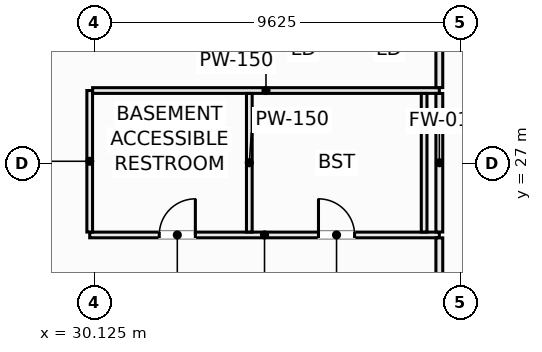
"""IFC4 building model, lengths in metres.
Left out: names, types, materials, properties, quantities, classifications, styles, units other than length and angle.
Written with IfcOpenShell. Run it as: python <this file> out.ifc"""

import sys

from ifc_helpers import new_model, si_unit, direction, frame, frame_2d, origin, place, context, subcontext, project, spatial, rectangle, extrude, element, fill, save


model = new_model("IFC4")
c1 = context("Model", 3, precision=1e-05, world=origin(), true_north=direction((0.0, 1.0)))
c2 = subcontext(c1, "Body", "Model", "MODEL_VIEW")
j1 = project(units=[si_unit("LENGTHUNIT", "METRE"), si_unit("PLANEANGLEUNIT", "RADIAN")], contexts=[c1])
p1 = place(None, origin())
s1 = spatial("IfcSite", under=j1, at=p1, CompositionType="ELEMENT")
p2 = place(p1, origin())
s2 = spatial("IfcBuilding", under=s1, at=p2, CompositionType="ELEMENT")
p3 = place(p2, frame((0.0, 0.0, -9.0)))
s3 = spatial("IfcBuildingStorey", under=s2, at=p3, CompositionType="ELEMENT", Elevation=-9.0)
p4 = place(p3, frame((30.0, 25.12, 0.0), z_axis=(0.0, 0.0, 1.0), x_axis=(1.0, 0.0, 0.0)))
e1 = element("IfcWall", 1, at=p4, inside=s3, PredefinedType="PARTITIONING", context=c2, shape_type="SweptSolid", body=[
    extrude(rectangle(XDim=9.2, YDim=0.15, at=frame_2d((4.6, 0.0))), origin(), (0.0, 0.0, 1.0), 4.18),
])
p5 = place(p4, frame((1.83, 0.0, 0.0)))
e2 = element("IfcOpeningElement", 2, at=p5, cuts=e1, PredefinedType="OPENING", context=c2, shape_type="SweptSolid", body=[
    extrude(rectangle(XDim=0.95, YDim=2.1, at=frame_2d((0.475, 1.05))), frame((0.0, 0.085, 0.0), z_axis=(0.0, -1.0, 0.0), x_axis=(1.0, 0.0, 0.0)), (0.0, 0.0, 1.0), 0.17),
])
p6 = place(p4, frame((6.02, 0.0, 0.0)))
e3 = element("IfcOpeningElement", 3, at=p6, cuts=e1, PredefinedType="OPENING", context=c2, shape_type="SweptSolid", body=[
    extrude(rectangle(XDim=0.95, YDim=2.1, at=frame_2d((0.475, 1.05))), frame((0.0, 0.085, 0.0), z_axis=(0.0, -1.0, 0.0), x_axis=(1.0, 0.0, 0.0)), (0.0, 0.0, 1.0), 0.17),
])
p7 = place(p3, frame((30.0, 25.197, 0.0), z_axis=(0.0, 0.0, 1.0), x_axis=(0.0, 1.0, 0.0)))
e4 = element("IfcWall", 4, at=p7, inside=s3, PredefinedType="PARTITIONING", context=c2, shape_type="SweptSolid", body=[
    extrude(rectangle(XDim=3.723, YDim=0.15, at=frame_2d((1.861, 0.0))), origin(), (0.0, 0.0, 1.0), 4.18),
])
p8 = place(p3, frame((30.077, 28.92, 0.0), z_axis=(0.0, 0.0, 1.0), x_axis=(1.0, 0.0, 0.0)))
e5 = element("IfcWall", 5, at=p8, inside=s3, PredefinedType="PARTITIONING", context=c2, shape_type="SweptSolid", body=[
    extrude(rectangle(XDim=9.123, YDim=0.15, at=frame_2d((4.562, 0.0))), origin(), (0.0, 0.0, 1.0), 4.18),
])
for number, where, z_axis, x_axis in (
    (6, (34.2, 25.197, 0.0), (0.0, 0.0, 1.0), (0.0, 1.0, 0.0)),
    (7, (38.8, 25.197, 0.0), (0.0, 0.0, 1.0), (0.0, 1.0, 0.0)),
):
    element("IfcWall", number, at=place(p3, frame(where, z_axis=z_axis, x_axis=x_axis)), inside=s3, PredefinedType="PARTITIONING", context=c2, shape_type="SweptSolid", body=[
        extrude(rectangle(XDim=3.646, YDim=0.15, at=frame_2d((1.823, 0.0))), origin(), (0.0, 0.0, 1.0), 4.18),
    ])
p9 = place(p3, frame((39.2, 3.2, 0.0), z_axis=(0.0, 0.0, 1.0), x_axis=(0.0, 1.0, 0.0)))
e8 = element("IfcWall", 8, at=p9, inside=s3, PredefinedType="SOLIDWALL", context=c2, shape_type="SweptSolid", body=[
    extrude(rectangle(XDim=21.843, YDim=0.18, at=frame_2d((10.921, 0.0))), origin(), (0.0, 0.0, 1.0), 3.414),
])
p10 = place(p3, frame((39.2, 25.197, 0.0), z_axis=(0.0, 0.0, 1.0), x_axis=(0.0, 1.0, 0.0)))
e9 = element("IfcWall", 9, at=p10, inside=s3, PredefinedType="SOLIDWALL", context=c2, shape_type="SweptSolid", body=[
    extrude(rectangle(XDim=3.646, YDim=0.18, at=frame_2d((1.823, 0.0))), origin(), (0.0, 0.0, 1.0), 4.18),
])
p11 = place(p3, frame((39.2, 28.997, 0.0), z_axis=(0.0, 0.0, 1.0), x_axis=(0.0, 1.0, 0.0)))
e10 = element("IfcWall", 10, at=p11, inside=s3, PredefinedType="SOLIDWALL", context=c2, shape_type="SweptSolid", body=[
    extrude(rectangle(XDim=15.111, YDim=0.18, at=frame_2d((7.555, 0.0))), origin(), (0.0, 0.0, 1.0), 3.414),
])
p12 = place(p11, frame((9.312, 0.0, 0.0)))
e11 = element("IfcOpeningElement", 11, at=p12, cuts=e10, PredefinedType="OPENING", context=c2, shape_type="SweptSolid", body=[
    extrude(rectangle(XDim=0.95, YDim=2.1, at=frame_2d((0.475, 1.05))), frame((0.0, 0.1, 0.0), z_axis=(0.0, -1.0, 0.0), x_axis=(1.0, 0.0, 0.0)), (0.0, 0.0, 1.0), 0.2),
])
p13 = place(p5, origin())
e12 = element("IfcDoor", 12, at=p13, inside=s3, OperationType="SINGLE_SWING_RIGHT", PredefinedType="DOOR", context=c2, shape_type="SweptSolid", body=[
    extrude(rectangle(XDim=0.95, YDim=2.1, at=frame_2d((0.475, 1.05))), frame((0.0, 0.025, 0.0), z_axis=(0.0, -1.0, 0.0), x_axis=(1.0, 0.0, 0.0)), (0.0, 0.0, 1.0), 0.05),
])
fill(e2, e12)
p14 = place(p6, origin())
e13 = element("IfcDoor", 13, at=p14, inside=s3, OperationType="SINGLE_SWING_LEFT", PredefinedType="DOOR", context=c2, shape_type="SweptSolid", body=[
    extrude(rectangle(XDim=0.95, YDim=2.1, at=frame_2d((0.475, 1.05))), frame((0.0, 0.025, 0.0), z_axis=(0.0, -1.0, 0.0), x_axis=(1.0, 0.0, 0.0)), (0.0, 0.0, 1.0), 0.05),
])
fill(e3, e13)
save(model, sys.argv[1])
